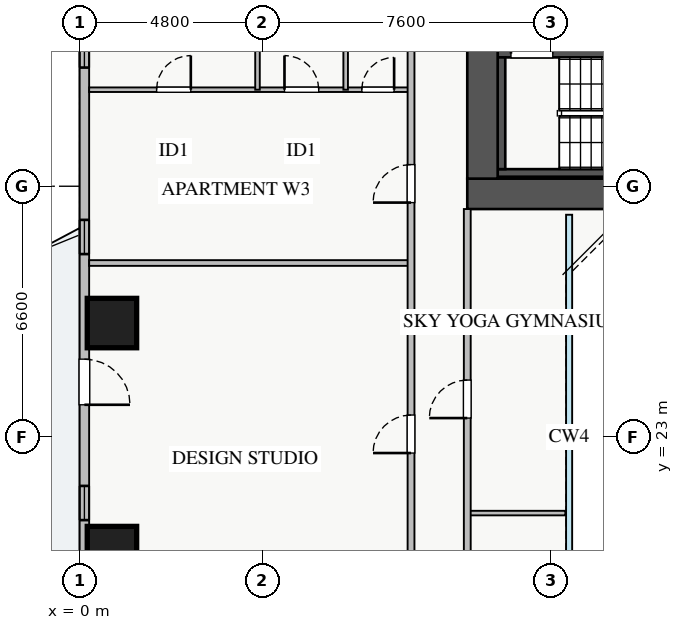
"""IFC4 building model, lengths in metres.
Left out: names, types, materials, properties, quantities, classifications, styles, units other than length and angle.
Written with IfcOpenShell. Run it as: python <this file> out.ifc"""

import sys

from ifc_helpers import new_model, si_unit, direction, frame, frame_2d, origin, origin_2d, place, context, subcontext, project, spatial, rectangle, extrude, source, transform, mapped, element, fill, save


model = new_model("IFC4")
c1 = context("Model", 3, precision=1e-05, world=origin(), true_north=direction((0.0, 1.0)))
c2 = subcontext(c1, "Body", "Model", "MODEL_VIEW")
j1 = project(units=[si_unit("LENGTHUNIT", "METRE"), si_unit("PLANEANGLEUNIT", "RADIAN")], contexts=[c1])
p1 = place(None, origin())
s1 = spatial("IfcSite", under=j1, at=p1, CompositionType="ELEMENT")
p2 = place(p1, origin())
s2 = spatial("IfcBuilding", under=s1, at=p2, CompositionType="ELEMENT")
p3 = place(p2, frame((0.0, 0.0, 89.25)))
s3 = spatial("IfcBuildingStorey", under=s2, at=p3, CompositionType="ELEMENT", Elevation=89.25)
p4 = place(p3, frame((12.68, 33.2, 0.0), z_axis=(0.0, 0.0, 1.0), x_axis=(1.0, 0.0, 0.0)))
e1 = element("IfcWall", 1, at=p4, inside=s3, PredefinedType="SHEAR", context=c2, shape_type="SweptSolid", body=[
    extrude(rectangle(XDim=1.94, YDim=0.18, at=frame_2d((0.97, 0.0))), origin(), (0.0, 0.0, 1.0), 3.03),
])
p5 = place(p3, frame((11.0, 29.95, 0.0), z_axis=(0.0, 0.0, 1.0), x_axis=(1.0, 0.0, 0.0)))
e2 = element("IfcWall", 2, at=p5, inside=s3, PredefinedType="SHEAR", context=c2, shape_type="SweptSolid", body=[
    extrude(rectangle(XDim=7.15, YDim=0.2, at=frame_2d((3.575, 0.0))), origin(), (0.0, 0.0, 1.0), 3.25),
])
p6 = place(p3, frame((11.0, 33.09, 0.0), z_axis=(0.0, 0.0, 1.0), x_axis=(1.0, 0.0, 0.0)))
e3 = element("IfcWall", 3, at=p6, inside=s3, PredefinedType="SHEAR", context=c2, shape_type="SweptSolid", body=[
    extrude(rectangle(XDim=7.15, YDim=0.2, at=frame_2d((3.575, 0.0))), origin(), (0.0, 0.0, 1.0), 3.25),
])
p7 = place(p6, frame((0.35, 0.0, 0.0)))
e4 = element("IfcOpeningElement", 4, at=p7, cuts=e3, PredefinedType="OPENING", context=c2, shape_type="SweptSolid", body=[
    extrude(rectangle(XDim=1.1, YDim=2.05, at=frame_2d((0.55, 1.025))), frame((0.0, 0.11, 0.0), z_axis=(0.0, -1.0, 0.0), x_axis=(1.0, 0.0, 0.0)), (0.0, 0.0, 1.0), 0.22),
])
p8 = place(p3, frame((11.1, 30.05, 0.0), z_axis=(0.0, 0.0, 1.0), x_axis=(0.0, 1.0, 0.0)))
e5 = element("IfcWall", 5, at=p8, inside=s3, PredefinedType="SHEAR", context=c2, shape_type="SweptSolid", body=[
    extrude(rectangle(XDim=2.94, YDim=0.2, at=frame_2d((1.47, 0.0))), origin(), (0.0, 0.0, 1.0), 3.25),
])
p9 = place(p3, frame((10.2, 29.4, 0.0), z_axis=(0.0, 0.0, 1.0), x_axis=(1.0, 0.0, 0.0)))
e6 = element("IfcWall", 6, at=p9, inside=s3, PredefinedType="SHEAR", context=c2, shape_type="SweptSolid", body=[
    extrude(rectangle(XDim=17.6, YDim=0.8, at=frame_2d((8.8, 0.0))), origin(), (0.0, 0.0, 1.0), 3.25),
])
p10 = place(p3, frame((10.6, 29.8, 0.0), z_axis=(0.0, 0.0, 1.0), x_axis=(0.0, 1.0, 0.0)))
e7 = element("IfcWall", 7, at=p10, inside=s3, PredefinedType="SHEAR", context=c2, shape_type="SweptSolid", body=[
    extrude(rectangle(XDim=5.6, YDim=0.8, at=frame_2d((2.8, 0.0))), origin(), (0.0, 0.0, 1.0), 3.25),
])
m1 = source(origin(), c2, "Body", "SweptSolid", [
    extrude(rectangle(XDim=1.3, YDim=1.3, at=origin_2d()), origin(), (0.0, 0.0, 1.0), 3.25),
])
for number, where, z_axis, x_axis in (
    (8, (0.85, 26.0, 0.0), (0.0, 0.0, 1.0), (1.0, 0.0, 0.0)),
    (9, (0.85, 20.0, 0.0), (0.0, 0.0, 1.0), (1.0, 0.0, 0.0)),
):
    element("IfcColumn", number, at=place(p3, frame(where, z_axis=z_axis, x_axis=x_axis)), inside=s3, PredefinedType="COLUMN", context=c2, shape_type="MappedRepresentation", body=[
        mapped(m1, transform((0.0, 0.0, 0.0), x_axis=(1.0, 0.0, 0.0), y_axis=(0.0, 1.0, 0.0), z_axis=(0.0, 0.0, 1.0), scale=1.0)),
    ])
p11 = place(p3, frame((0.125, 9.45, 0.0), z_axis=(0.0, 0.0, 1.0), x_axis=(0.0, 1.0, 0.0)))
e10 = element("IfcWall", 10, at=p11, inside=s3, PredefinedType="STANDARD", context=c2, shape_type="SweptSolid", body=[
    extrude(rectangle(XDim=27.1, YDim=0.25, at=frame_2d((13.55, 0.0))), origin(), (0.0, 0.0, 1.0), 2.57),
])
p12 = place(p11, frame((14.4, 0.0, 0.0)))
e11 = element("IfcOpeningElement", 11, at=p12, cuts=e10, PredefinedType="OPENING", context=c2, shape_type="SweptSolid", body=[
    extrude(rectangle(XDim=1.2, YDim=2.1, at=frame_2d((0.6, 1.05))), frame((0.0, 0.135, 0.0), z_axis=(0.0, -1.0, 0.0), x_axis=(1.0, 0.0, 0.0)), (0.0, 0.0, 1.0), 0.27),
])
p13 = place(p11, frame((1.482, 0.0, 0.9)))
e12 = element("IfcOpeningElement", 12, at=p13, cuts=e10, PredefinedType="OPENING", context=c2, shape_type="SweptSolid", body=[
    extrude(rectangle(XDim=2.1, YDim=1.5, at=frame_2d((1.05, 0.75))), frame((0.0, 0.135, 0.0), z_axis=(0.0, -1.0, 0.0), x_axis=(1.0, 0.0, 0.0)), (0.0, 0.0, 1.0), 0.27),
])
p14 = place(p11, frame((23.272, 0.0, 0.9)))
e13 = element("IfcOpeningElement", 13, at=p14, cuts=e10, PredefinedType="OPENING", context=c2, shape_type="SweptSolid", body=[
    extrude(rectangle(XDim=2.1, YDim=1.5, at=frame_2d((1.05, 0.75))), frame((0.0, 0.135, 0.0), z_axis=(0.0, -1.0, 0.0), x_axis=(1.0, 0.0, 0.0)), (0.0, 0.0, 1.0), 0.27),
])
p15 = place(p11, frame((5.317, 0.0, 0.9)))
e14 = element("IfcOpeningElement", 14, at=p15, cuts=e10, PredefinedType="OPENING", context=c2, shape_type="SweptSolid", body=[
    extrude(rectangle(XDim=2.4, YDim=1.5, at=frame_2d((1.2, 0.75))), frame((0.0, 0.135, 0.0), z_axis=(0.0, -1.0, 0.0), x_axis=(1.0, 0.0, 0.0)), (0.0, 0.0, 1.0), 0.27),
])
p16 = place(p11, frame((11.365, 0.0, 0.9)))
e15 = element("IfcOpeningElement", 15, at=p16, cuts=e10, PredefinedType="OPENING", context=c2, shape_type="SweptSolid", body=[
    extrude(rectangle(XDim=0.9, YDim=1.2, at=frame_2d((0.45, 0.6))), frame((0.0, 0.135, 0.0), z_axis=(0.0, -1.0, 0.0), x_axis=(1.0, 0.0, 0.0)), (0.0, 0.0, 1.0), 0.27),
])
p17 = place(p11, frame((18.365, 0.0, 0.9)))
e16 = element("IfcOpeningElement", 16, at=p17, cuts=e10, PredefinedType="OPENING", context=c2, shape_type="SweptSolid", body=[
    extrude(rectangle(XDim=0.9, YDim=1.2, at=frame_2d((0.45, 0.6))), frame((0.0, 0.135, 0.0), z_axis=(0.0, -1.0, 0.0), x_axis=(1.0, 0.0, 0.0)), (0.0, 0.0, 1.0), 0.27),
])
p18 = place(p3, frame((0.25, 32.14, 0.0), z_axis=(0.0, 0.0, 1.0), x_axis=(1.0, 0.0, 0.0)))
e17 = element("IfcWall", 17, at=p18, inside=s3, PredefinedType="PLUMBINGWALL", context=c2, shape_type="SweptSolid", body=[
    extrude(rectangle(XDim=8.47, YDim=0.12, at=frame_2d((4.235, 0.0))), origin(), (0.0, 0.0, 1.0), 3.03),
])
p19 = place(p18, frame((1.775, 0.0, 0.0)))
e18 = element("IfcOpeningElement", 18, at=p19, cuts=e17, PredefinedType="OPENING", context=c2, shape_type="SweptSolid", body=[
    extrude(rectangle(XDim=0.9, YDim=2.05, at=frame_2d((0.45, 1.025))), frame((0.0, 0.07, 0.0), z_axis=(0.0, -1.0, 0.0), x_axis=(1.0, 0.0, 0.0)), (0.0, 0.0, 1.0), 0.14),
])
p20 = place(p18, frame((5.14, 0.0, 0.0)))
e19 = element("IfcOpeningElement", 19, at=p20, cuts=e17, PredefinedType="OPENING", context=c2, shape_type="SweptSolid", body=[
    extrude(rectangle(XDim=0.9, YDim=2.05, at=frame_2d((0.45, 1.025))), frame((0.0, 0.07, 0.0), z_axis=(0.0, -1.0, 0.0), x_axis=(1.0, 0.0, 0.0)), (0.0, 0.0, 1.0), 0.14),
])
p21 = place(p18, frame((7.175, 0.0, 0.0)))
e20 = element("IfcOpeningElement", 20, at=p21, cuts=e17, PredefinedType="OPENING", context=c2, shape_type="SweptSolid", body=[
    extrude(rectangle(XDim=0.85, YDim=2.05, at=frame_2d((0.425, 1.025))), frame((0.0, 0.07, 0.0), z_axis=(0.0, -1.0, 0.0), x_axis=(1.0, 0.0, 0.0)), (0.0, 0.0, 1.0), 0.14),
])
for number, where, z_axis, x_axis in (
    (21, (4.68, 32.14, 0.0), (0.0, 0.0, 1.0), (0.0, 1.0, 0.0)),
    (22, (7.0, 32.14, 0.0), (0.0, 0.0, 1.0), (0.0, 1.0, 0.0)),
):
    element("IfcWall", number, at=place(p3, frame(where, z_axis=z_axis, x_axis=x_axis)), inside=s3, PredefinedType="PLUMBINGWALL", context=c2, shape_type="SweptSolid", body=[
        extrude(rectangle(XDim=4.94, YDim=0.12, at=frame_2d((2.47, 0.0))), origin(), (0.0, 0.0, 1.0), 3.03),
    ])
p22 = place(p3, frame((0.25, 27.58, 0.0), z_axis=(0.0, 0.0, 1.0), x_axis=(1.0, 0.0, 0.0)))
e23 = element("IfcWall", 23, at=p22, inside=s3, PredefinedType="PARTITIONING", context=c2, shape_type="SweptSolid", body=[
    extrude(rectangle(XDim=8.47, YDim=0.15, at=frame_2d((4.235, 0.0))), origin(), (0.0, 0.0, 1.0), 2.781),
])
p23 = place(p3, frame((8.72, 7.21, 0.0), z_axis=(0.0, 0.0, 1.0), x_axis=(0.0, 1.0, 0.0)))
e24 = element("IfcWall", 24, at=p23, inside=s3, PredefinedType="PARTITIONING", context=c2, shape_type="SweptSolid", body=[
    extrude(rectangle(XDim=31.23, YDim=0.18, at=frame_2d((15.615, 0.0))), origin(), (0.0, 0.0, 1.0), 3.03),
])
p24 = place(p23, frame((30.09, 0.0, 0.0)))
e25 = element("IfcOpeningElement", 25, at=p24, cuts=e24, PredefinedType="OPENING", context=c2, shape_type="SweptSolid", body=[
    extrude(rectangle(XDim=0.9, YDim=2.05, at=frame_2d((0.45, 1.025))), frame((0.0, 0.1, 0.0), z_axis=(0.0, -1.0, 0.0), x_axis=(1.0, 0.0, 0.0)), (0.0, 0.0, 1.0), 0.2),
])
p25 = place(p23, frame((0.24, 0.0, 0.0)))
e26 = element("IfcOpeningElement", 26, at=p25, cuts=e24, PredefinedType="OPENING", context=c2, shape_type="SweptSolid", body=[
    extrude(rectangle(XDim=0.9, YDim=2.05, at=frame_2d((0.45, 1.025))), frame((0.0, 0.1, 0.0), z_axis=(0.0, -1.0, 0.0), x_axis=(1.0, 0.0, 0.0)), (0.0, 0.0, 1.0), 0.2),
])
p26 = place(p23, frame((3.07, 0.0, 0.0)))
e27 = element("IfcOpeningElement", 27, at=p26, cuts=e24, PredefinedType="OPENING", context=c2, shape_type="SweptSolid", body=[
    extrude(rectangle(XDim=1.0, YDim=2.05, at=frame_2d((0.5, 1.025))), frame((0.0, 0.1, 0.0), z_axis=(0.0, -1.0, 0.0), x_axis=(1.0, 0.0, 0.0)), (0.0, 0.0, 1.0), 0.2),
])
p27 = place(p23, frame((15.37, 0.0, 0.0)))
e28 = element("IfcOpeningElement", 28, at=p27, cuts=e24, PredefinedType="OPENING", context=c2, shape_type="SweptSolid", body=[
    extrude(rectangle(XDim=1.0, YDim=2.05, at=frame_2d((0.5, 1.025))), frame((0.0, 0.1, 0.0), z_axis=(0.0, -1.0, 0.0), x_axis=(1.0, 0.0, 0.0)), (0.0, 0.0, 1.0), 0.2),
])
p28 = place(p23, frame((21.96, 0.0, 0.0)))
e29 = element("IfcOpeningElement", 29, at=p28, cuts=e24, PredefinedType="OPENING", context=c2, shape_type="SweptSolid", body=[
    extrude(rectangle(XDim=1.0, YDim=2.05, at=frame_2d((0.5, 1.025))), frame((0.0, 0.1, 0.0), z_axis=(0.0, -1.0, 0.0), x_axis=(1.0, 0.0, 0.0)), (0.0, 0.0, 1.0), 0.2),
])
p29 = place(p3, frame((10.2, 21.0, 0.0), z_axis=(0.0, 0.0, 1.0), x_axis=(1.0, 0.0, 0.0)))
e30 = element("IfcWall", 30, at=p29, inside=s3, PredefinedType="PLUMBINGWALL", context=c2, shape_type="SweptSolid", body=[
    extrude(rectangle(XDim=2.58, YDim=0.12, at=frame_2d((1.29, 0.0))), origin(), (0.0, 0.0, 1.0), 3.03),
])
p30 = place(p3, frame((10.2, 17.0, 0.0), z_axis=(0.0, 0.0, 1.0), x_axis=(0.0, 1.0, 0.0)))
e31 = element("IfcWall", 31, at=p30, inside=s3, PredefinedType="PARTITIONING", context=c2, shape_type="SweptSolid", body=[
    extrude(rectangle(XDim=12.0, YDim=0.18, at=frame_2d((6.0, 0.0))), origin(), (0.0, 0.0, 1.0), 3.03),
])
p31 = place(p30, frame((1.5, 0.0, 0.0)))
e32 = element("IfcOpeningElement", 32, at=p31, cuts=e31, PredefinedType="OPENING", context=c2, shape_type="SweptSolid", body=[
    extrude(rectangle(XDim=0.85, YDim=2.05, at=frame_2d((0.425, 1.025))), frame((0.0, 0.1, 0.0), z_axis=(0.0, -1.0, 0.0), x_axis=(1.0, 0.0, 0.0)), (0.0, 0.0, 1.0), 0.2),
])
p32 = place(p30, frame((6.5, 0.0, 0.0)))
e33 = element("IfcOpeningElement", 33, at=p32, cuts=e31, PredefinedType="OPENING", context=c2, shape_type="SweptSolid", body=[
    extrude(rectangle(XDim=1.0, YDim=2.05, at=frame_2d((0.5, 1.025))), frame((0.0, 0.1, 0.0), z_axis=(0.0, -1.0, 0.0), x_axis=(1.0, 0.0, 0.0)), (0.0, 0.0, 1.0), 0.2),
])
m2 = source(origin(), c2, "Body", "SweptSolid", [
    extrude(rectangle(XDim=1.2, YDim=2.1, at=frame_2d((0.6, 1.05))), frame((0.0, 0.025, 0.0), z_axis=(0.0, -1.0, 0.0), x_axis=(1.0, 0.0, 0.0)), (0.0, 0.0, 1.0), 0.05),
])
p33 = place(p12, frame((1.2, 0.0, 0.0), z_axis=(0.0, 0.0, 1.0), x_axis=(-1.0, 0.0, 0.0)))
e34 = element("IfcDoor", 34, at=p33, inside=s3, OperationType="SINGLE_SWING_LEFT", PredefinedType="DOOR", context=c2, shape_type="MappedRepresentation", body=[
    mapped(m2, transform((0.0, 0.0, 0.0), x_axis=(1.0, 0.0, 0.0), y_axis=(0.0, 1.0, 0.0), z_axis=(0.0, 0.0, 1.0), scale=1.0)),
])
fill(e11, e34)
m3 = source(origin(), c2, "Body", "SweptSolid", [
    extrude(rectangle(XDim=2.1, YDim=1.5, at=frame_2d((1.05, 0.75))), frame((0.0, 0.03, 0.0), z_axis=(0.0, -1.0, 0.0), x_axis=(1.0, 0.0, 0.0)), (0.0, 0.0, 1.0), 0.06),
])
p34 = place(p14, origin())
e35 = element("IfcWindow", 35, at=p34, inside=s3, PartitioningType="TRIPLE_PANEL_VERTICAL", PredefinedType="WINDOW", context=c2, shape_type="MappedRepresentation", body=[
    mapped(m3, transform((0.0, 0.0, 0.0), x_axis=(1.0, 0.0, 0.0), y_axis=(0.0, 1.0, 0.0), z_axis=(0.0, 0.0, 1.0), scale=1.0)),
])
fill(e13, e35)
m4 = source(origin(), c2, "Body", "SweptSolid", [
    extrude(rectangle(XDim=1.1, YDim=2.05, at=frame_2d((0.55, 1.025))), frame((0.0, 0.025, 0.0), z_axis=(0.0, -1.0, 0.0), x_axis=(1.0, 0.0, 0.0)), (0.0, 0.0, 1.0), 0.05),
])
p35 = place(p7, origin())
e36 = element("IfcDoor", 36, at=p35, inside=s3, OperationType="SINGLE_SWING_LEFT", PredefinedType="DOOR", context=c2, shape_type="MappedRepresentation", body=[
    mapped(m4, transform((0.0, 0.0, 0.0), x_axis=(1.0, 0.0, 0.0), y_axis=(0.0, 1.0, 0.0), z_axis=(0.0, 0.0, 1.0), scale=1.0)),
])
fill(e4, e36)
m5 = source(origin(), c2, "Body", "SweptSolid", [
    extrude(rectangle(XDim=0.9, YDim=2.05, at=frame_2d((0.45, 1.025))), frame((0.0, 0.025, 0.0), z_axis=(0.0, -1.0, 0.0), x_axis=(1.0, 0.0, 0.0)), (0.0, 0.0, 1.0), 0.05),
])
p36 = place(p19, origin())
e37 = element("IfcDoor", 37, at=p36, inside=s3, OperationType="SINGLE_SWING_RIGHT", PredefinedType="DOOR", context=c2, shape_type="MappedRepresentation", body=[
    mapped(m5, transform((0.0, 0.0, 0.0), x_axis=(1.0, 0.0, 0.0), y_axis=(0.0, 1.0, 0.0), z_axis=(0.0, 0.0, 1.0), scale=1.0)),
])
fill(e18, e37)
p37 = place(p20, origin())
e38 = element("IfcDoor", 38, at=p37, inside=s3, OperationType="SINGLE_SWING_LEFT", PredefinedType="DOOR", context=c2, shape_type="MappedRepresentation", body=[
    mapped(m5, transform((0.0, 0.0, 0.0), x_axis=(1.0, 0.0, 0.0), y_axis=(0.0, 1.0, 0.0), z_axis=(0.0, 0.0, 1.0), scale=1.0)),
])
fill(e19, e38)
m6 = source(origin(), c2, "Body", "SweptSolid", [
    extrude(rectangle(XDim=0.85, YDim=2.05, at=frame_2d((0.425, 1.025))), frame((0.0, 0.025, 0.0), z_axis=(0.0, -1.0, 0.0), x_axis=(1.0, 0.0, 0.0)), (0.0, 0.0, 1.0), 0.05),
])
p38 = place(p21, origin())
e39 = element("IfcDoor", 39, at=p38, inside=s3, OperationType="SINGLE_SWING_RIGHT", PredefinedType="DOOR", context=c2, shape_type="MappedRepresentation", body=[
    mapped(m6, transform((0.0, 0.0, 0.0), x_axis=(1.0, 0.0, 0.0), y_axis=(0.0, 1.0, 0.0), z_axis=(0.0, 0.0, 1.0), scale=1.0)),
])
fill(e20, e39)
m7 = source(origin(), c2, "Body", "SweptSolid", [
    extrude(rectangle(XDim=1.0, YDim=2.05, at=frame_2d((0.5, 1.025))), frame((0.0, 0.025, 0.0), z_axis=(0.0, -1.0, 0.0), x_axis=(1.0, 0.0, 0.0)), (0.0, 0.0, 1.0), 0.05),
])
p39 = place(p27, origin())
e40 = element("IfcDoor", 40, at=p39, inside=s3, OperationType="SINGLE_SWING_LEFT", PredefinedType="DOOR", context=c2, shape_type="MappedRepresentation", body=[
    mapped(m7, transform((0.0, 0.0, 0.0), x_axis=(1.0, 0.0, 0.0), y_axis=(0.0, 1.0, 0.0), z_axis=(0.0, 0.0, 1.0), scale=1.0)),
])
fill(e28, e40)
p40 = place(p28, origin())
e41 = element("IfcDoor", 41, at=p40, inside=s3, OperationType="SINGLE_SWING_LEFT", PredefinedType="DOOR", context=c2, shape_type="MappedRepresentation", body=[
    mapped(m7, transform((0.0, 0.0, 0.0), x_axis=(1.0, 0.0, 0.0), y_axis=(0.0, 1.0, 0.0), z_axis=(0.0, 0.0, 1.0), scale=1.0)),
])
fill(e29, e41)
p41 = place(p32, origin())
e42 = element("IfcDoor", 42, at=p41, inside=s3, OperationType="SINGLE_SWING_LEFT", PredefinedType="DOOR", context=c2, shape_type="MappedRepresentation", body=[
    mapped(m7, transform((0.0, 0.0, 0.0), x_axis=(1.0, 0.0, 0.0), y_axis=(0.0, 1.0, 0.0), z_axis=(0.0, 0.0, 1.0), scale=1.0)),
])
fill(e33, e42)
m8 = source(origin(), c2, "Body", "SweptSolid", [
    extrude(rectangle(XDim=0.9, YDim=1.2, at=frame_2d((0.45, 0.6))), frame((0.0, 0.03, 0.0), z_axis=(0.0, -1.0, 0.0), x_axis=(1.0, 0.0, 0.0)), (0.0, 0.0, 1.0), 0.06),
])
p42 = place(p16, origin())
e43 = element("IfcWindow", 43, at=p42, inside=s3, PartitioningType="SINGLE_PANEL", PredefinedType="WINDOW", context=c2, shape_type="MappedRepresentation", body=[
    mapped(m8, transform((0.0, 0.0, 0.0), x_axis=(1.0, 0.0, 0.0), y_axis=(0.0, 1.0, 0.0), z_axis=(0.0, 0.0, 1.0), scale=1.0)),
])
fill(e15, e43)
p43 = place(p17, origin())
e44 = element("IfcWindow", 44, at=p43, inside=s3, PartitioningType="SINGLE_PANEL", PredefinedType="WINDOW", context=c2, shape_type="MappedRepresentation", body=[
    mapped(m8, transform((0.0, 0.0, 0.0), x_axis=(1.0, 0.0, 0.0), y_axis=(0.0, 1.0, 0.0), z_axis=(0.0, 0.0, 1.0), scale=1.0)),
])
fill(e16, e44)
save(model, sys.argv[1])
